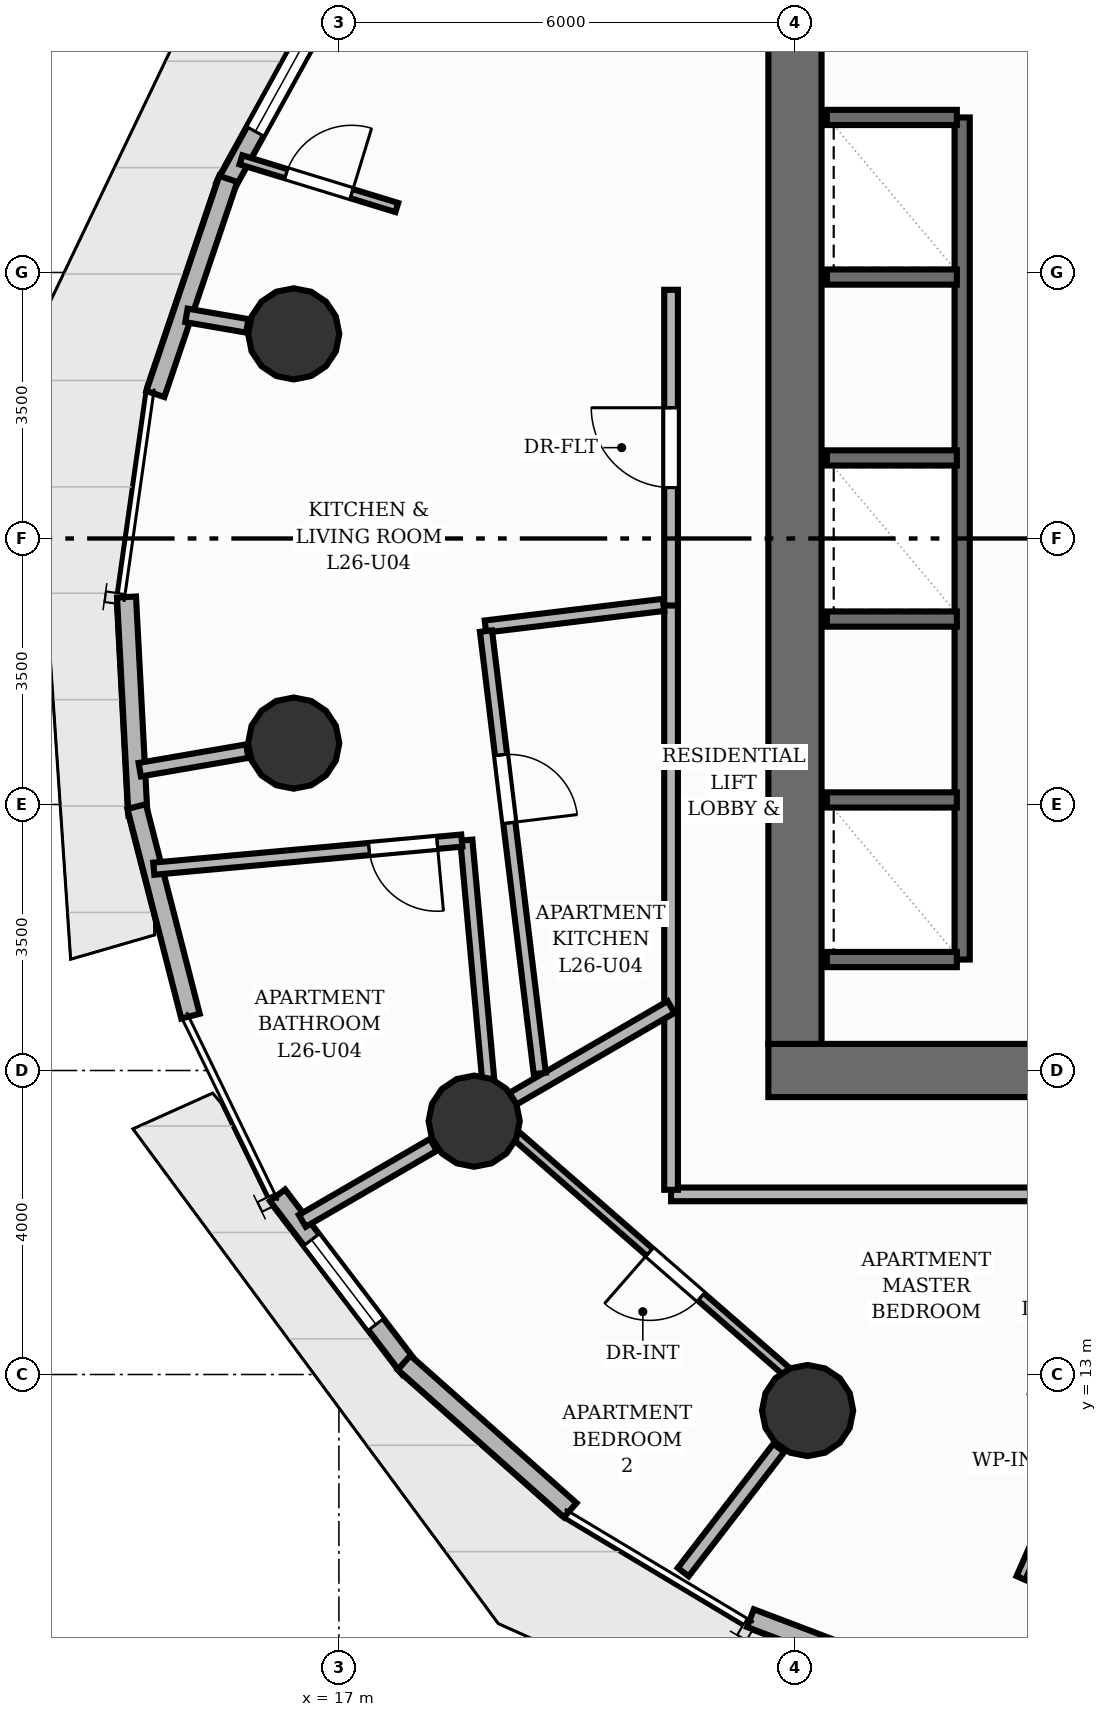
"""IFC4 building model, lengths in metres.
Left out: names, types, materials, properties, quantities, classifications, styles, units other than length and angle.
Written with IfcOpenShell. Run it as: python <this file> out.ifc"""

import sys

from ifc_helpers import new_model, si_unit, direction, frame, frame_2d, origin, origin_2d, place, context, subcontext, project, spatial, rectangle, circle, extrude, element, fill, save


model = new_model("IFC4")
c1 = context("Model", 3, precision=1e-05, world=origin(), true_north=direction((0.0, 1.0)))
c2 = subcontext(c1, "Body", "Model", "MODEL_VIEW")
j1 = project(units=[si_unit("LENGTHUNIT", "METRE"), si_unit("PLANEANGLEUNIT", "RADIAN")], contexts=[c1])
p1 = place(None, origin())
s1 = spatial("IfcSite", under=j1, at=p1, CompositionType="ELEMENT")
p2 = place(p1, origin())
s2 = spatial("IfcBuilding", under=s1, at=p2, CompositionType="ELEMENT")
p3 = place(p2, frame((0.0, 0.0, 90.08)))
s3 = spatial("IfcBuildingStorey", under=s2, at=p3, CompositionType="ELEMENT", Elevation=90.08)
p4 = place(p3, frame((22.65, 17.0, 0.0), z_axis=(0.0, 0.0, 1.0), x_axis=(1.0, 0.0, 0.0)))
e1 = element("IfcWall", 1, at=p4, inside=s3, PredefinedType="SHEAR", context=c2, shape_type="SweptSolid", body=[
    extrude(rectangle(XDim=18.7, YDim=0.7, at=frame_2d((9.35, 0.0))), origin(), (0.0, 0.0, 1.0), 3.2),
])
p5 = place(p4, frame((5.85, 0.0, 0.0)))
e2 = element("IfcOpeningElement", 2, at=p5, cuts=e1, PredefinedType="OPENING", context=c2, shape_type="SweptSolid", body=[
    extrude(rectangle(XDim=1.1, YDim=2.15, at=frame_2d((0.55, 1.075))), frame((0.0, 0.36, 0.0), z_axis=(0.0, -1.0, 0.0), x_axis=(1.0, 0.0, 0.0)), (0.0, 0.0, 1.0), 0.72),
])
p6 = place(p4, frame((9.4, 0.0, 0.0)))
e3 = element("IfcOpeningElement", 3, at=p6, cuts=e1, PredefinedType="OPENING", context=c2, shape_type="SweptSolid", body=[
    extrude(rectangle(XDim=0.9, YDim=2.1, at=frame_2d((0.45, 1.05))), frame((0.0, 0.36, 0.0), z_axis=(0.0, -1.0, 0.0), x_axis=(1.0, 0.0, 0.0)), (0.0, 0.0, 1.0), 0.72),
])
p7 = place(p3, frame((23.0, 17.35, 0.0), z_axis=(0.0, 0.0, 1.0), x_axis=(0.0, 1.0, 0.0)))
e4 = element("IfcWall", 4, at=p7, inside=s3, PredefinedType="SHEAR", context=c2, shape_type="SweptSolid", body=[
    extrude(rectangle(XDim=13.3, YDim=0.7, at=frame_2d((6.65, 0.0))), origin(), (0.0, 0.0, 1.0), 3.2),
])
for number, where, z_axis, x_axis in (
    (5, (16.406, 26.692, 0.0), (0.0, 0.0, 1.0), (1.0, 0.0, 0.0)),
    (6, (16.406, 21.308, 0.0), (0.0, 0.0, 1.0), (1.0, 0.0, 0.0)),
    (7, (18.78, 16.333, 0.0), (0.0, 0.0, 1.0), (1.0, 0.0, 0.0)),
    (8, (23.167, 12.526, 0.0), (0.0, 0.0, 1.0), (1.0, 0.0, 0.0)),
):
    element("IfcColumn", number, at=place(p3, frame(where, z_axis=z_axis, x_axis=x_axis)), inside=s3, PredefinedType="COLUMN", context=c2, shape_type="SweptSolid", body=[
        extrude(circle(Radius=0.6, at=origin_2d()), origin(), (0.0, 0.0, 1.0), 3.2),
    ])
p8 = place(p3, frame((15.5, 28.629, 0.0), z_axis=(0.0, 0.0, 1.0), x_axis=(0.482904421948, 0.875673066426, 0.0)))
e9 = element("IfcWall", 9, at=p8, inside=s3, PredefinedType="SOLIDWALL", context=c2, shape_type="SweptSolid", body=[
    extrude(rectangle(XDim=3.061, YDim=0.25, at=frame_2d((1.53, 0.0))), origin(), (0.0, 0.0, 1.0), 2.96),
])
p9 = place(p8, frame((0.83, 0.0, 0.85)))
e10 = element("IfcOpeningElement", 10, at=p9, cuts=e9, PredefinedType="OPENING", context=c2, shape_type="SweptSolid", body=[
    extrude(rectangle(XDim=1.4, YDim=1.55, at=frame_2d((0.7, 0.775))), frame((0.0, 0.135, 0.0), z_axis=(0.0, -1.0, 0.0), x_axis=(1.0, 0.0, 0.0)), (0.0, 0.0, 1.0), 0.27),
])
p10 = place(p3, frame((14.585, 25.901, 0.0), z_axis=(0.0, 0.0, 1.0), x_axis=(0.321149814784, 0.947028403198, 0.0)))
e11 = element("IfcWall", 11, at=p10, inside=s3, PredefinedType="SOLIDWALL", context=c2, shape_type="SweptSolid", body=[
    extrude(rectangle(XDim=2.988, YDim=0.25, at=frame_2d((1.494, 0.0))), origin(), (0.0, 0.0, 1.0), 2.96),
])
p11 = place(p3, frame((14.356, 20.36, 0.0), z_axis=(0.0, 0.0, 1.0), x_axis=(-0.052411702269, 0.998625562193, 0.0)))
e12 = element("IfcWall", 12, at=p11, inside=s3, PredefinedType="SOLIDWALL", context=c2, shape_type="SweptSolid", body=[
    extrude(rectangle(XDim=2.874, YDim=0.25, at=frame_2d((1.437, 0.0))), origin(), (0.0, 0.0, 1.0), 2.96),
])
p12 = place(p3, frame((15.047, 17.715, 0.0), z_axis=(0.0, 0.0, 1.0), x_axis=(-0.248825035787, 0.96854845081, 0.0)))
e13 = element("IfcWall", 13, at=p12, inside=s3, PredefinedType="SOLIDWALL", context=c2, shape_type="SweptSolid", body=[
    extrude(rectangle(XDim=2.847, YDim=0.25, at=frame_2d((1.424, 0.0))), origin(), (0.0, 0.0, 1.0), 2.96),
])
p13 = place(p3, frame((17.935, 13.073, 0.0), z_axis=(0.0, 0.0, 1.0), x_axis=(-0.606166055027, 0.795338112838, 0.0)))
e14 = element("IfcWall", 14, at=p13, inside=s3, PredefinedType="SOLIDWALL", context=c2, shape_type="SweptSolid", body=[
    extrude(rectangle(XDim=2.874, YDim=0.25, at=frame_2d((1.437, 0.0))), origin(), (0.0, 0.0, 1.0), 2.96),
])
p14 = place(p13, frame((0.737, 0.0, 0.85)))
e15 = element("IfcOpeningElement", 15, at=p14, cuts=e14, PredefinedType="OPENING", context=c2, shape_type="SweptSolid", body=[
    extrude(rectangle(XDim=1.4, YDim=1.37, at=frame_2d((0.7, 0.685))), frame((0.0, 0.135, 0.0), z_axis=(0.0, -1.0, 0.0), x_axis=(1.0, 0.0, 0.0)), (0.0, 0.0, 1.0), 0.27),
])
p15 = place(p3, frame((20.043, 11.216, 0.0), z_axis=(0.0, 0.0, 1.0), x_axis=(-0.747828492436, 0.663891968547, 0.0)))
e16 = element("IfcWall", 16, at=p15, inside=s3, PredefinedType="SOLIDWALL", context=c2, shape_type="SweptSolid", body=[
    extrude(rectangle(XDim=2.923, YDim=0.25, at=frame_2d((1.461, 0.0))), origin(), (0.0, 0.0, 1.0), 2.96),
])
p16 = place(p3, frame((25.276, 8.707, 0.0), z_axis=(0.0, 0.0, 1.0), x_axis=(-0.934815891493, 0.355132720277, 0.0)))
e17 = element("IfcWall", 17, at=p16, inside=s3, PredefinedType="SOLIDWALL", context=c2, shape_type="SweptSolid", body=[
    extrude(rectangle(XDim=3.061, YDim=0.25, at=frame_2d((1.53, 0.0))), origin(), (0.0, 0.0, 1.0), 2.96),
])
p17 = place(p3, frame((25.2, 18.46, 0.0), z_axis=(0.0, 0.0, 1.0), x_axis=(0.0, 1.0, 0.0)))
e18 = element("IfcWall", 18, at=p17, inside=s3, PredefinedType="SHEAR", context=c2, shape_type="SweptSolid", body=[
    extrude(rectangle(XDim=11.08, YDim=0.2, at=frame_2d((5.54, 0.0))), origin(), (0.0, 0.0, 1.0), 3.2),
])
for number, where, z_axis, x_axis in (
    (19, (23.42, 18.46, 0.0), (0.0, 0.0, 1.0), (1.0, 0.0, 0.0)),
    (20, (23.42, 29.54, 0.0), (0.0, 0.0, 1.0), (1.0, 0.0, 0.0)),
    (21, (23.42, 20.56, 0.0), (0.0, 0.0, 1.0), (1.0, 0.0, 0.0)),
    (22, (23.42, 22.94, 0.0), (0.0, 0.0, 1.0), (1.0, 0.0, 0.0)),
    (23, (23.42, 25.06, 0.0), (0.0, 0.0, 1.0), (1.0, 0.0, 0.0)),
    (24, (23.42, 27.44, 0.0), (0.0, 0.0, 1.0), (1.0, 0.0, 0.0)),
):
    element("IfcWall", number, at=place(p3, frame(where, z_axis=z_axis, x_axis=x_axis)), inside=s3, PredefinedType="SHEAR", context=c2, shape_type="SweptSolid", body=[
        extrude(rectangle(XDim=1.71, YDim=0.2, at=frame_2d((0.855, 0.0))), origin(), (0.0, 0.0, 1.0), 3.2),
    ])
p18 = place(p3, frame((15.794, 26.798, 0.0), z_axis=(0.0, 0.0, 1.0), x_axis=(-0.985418430365, 0.170148514822, 0.0)))
e25 = element("IfcWall", 25, at=p18, inside=s3, PredefinedType="PARTITIONING", context=c2, shape_type="SweptSolid", body=[
    extrude(rectangle(XDim=0.812, YDim=0.18, at=frame_2d((0.406, 0.0))), origin(), (0.0, 0.0, 1.0), 2.26),
])
p19 = place(p3, frame((15.794, 21.202, 0.0), z_axis=(0.0, 0.0, 1.0), x_axis=(-0.985402123708, -0.170242928172, 0.0)))
e26 = element("IfcWall", 26, at=p19, inside=s3, PredefinedType="PARTITIONING", context=c2, shape_type="SweptSolid", body=[
    extrude(rectangle(XDim=1.436, YDim=0.18, at=frame_2d((0.718, 0.0))), origin(), (0.0, 0.0, 1.0), 2.26),
])
p20 = place(p3, frame((18.243, 16.022, 0.0), z_axis=(0.0, 0.0, 1.0), x_axis=(-0.865046065875, -0.501692439563, 0.0)))
e27 = element("IfcWall", 27, at=p20, inside=s3, PredefinedType="PARTITIONING", context=c2, shape_type="SweptSolid", body=[
    extrude(rectangle(XDim=1.994, YDim=0.18, at=frame_2d((0.997, 0.0))), origin(), (0.0, 0.0, 1.0), 2.26),
])
p21 = place(p3, frame((22.788, 12.034, 0.0), z_axis=(0.0, 0.0, 1.0), x_axis=(-0.609991040385, -0.792408310564, 0.0)))
e28 = element("IfcWall", 28, at=p21, inside=s3, PredefinedType="PARTITIONING", context=c2, shape_type="SweptSolid", body=[
    extrude(rectangle(XDim=2.062, YDim=0.18, at=frame_2d((1.031, 0.0))), origin(), (0.0, 0.0, 1.0), 2.26),
])
p22 = place(p3, frame((41.695, 15.37, 0.0), z_axis=(0.0, 0.0, 1.0), x_axis=(-1.0, 0.0, 0.0)))
e29 = element("IfcWall", 29, at=p22, inside=s3, PredefinedType="PARTITIONING", context=c2, shape_type="SweptSolid", body=[
    extrude(rectangle(XDim=20.325, YDim=0.18, at=frame_2d((10.163, 0.0))), origin(), (0.0, 0.0, 1.0), 2.955),
])
p23 = place(p22, frame((11.424, 0.0, 0.0)))
e30 = element("IfcOpeningElement", 30, at=p23, cuts=e29, PredefinedType="OPENING", context=c2, shape_type="SweptSolid", body=[
    extrude(rectangle(XDim=1.05, YDim=2.15, at=frame_2d((0.525, 1.075))), frame((0.0, 0.1, 0.0), z_axis=(0.0, -1.0, 0.0), x_axis=(1.0, 0.0, 0.0)), (0.0, 0.0, 1.0), 0.2),
])
p24 = place(p3, frame((21.37, 15.43, 0.0), z_axis=(0.0, 0.0, 1.0), x_axis=(0.0, 1.0, 0.0)))
e31 = element("IfcWall", 31, at=p24, inside=s3, PredefinedType="PARTITIONING", context=c2, shape_type="SweptSolid", body=[
    extrude(rectangle(XDim=7.727, YDim=0.18, at=frame_2d((3.863, 0.0))), origin(), (0.0, 0.0, 1.0), 2.955),
])
p25 = place(p3, frame((21.37, 23.118, 0.0), z_axis=(0.0, 0.0, 1.0), x_axis=(0.0, 1.0, 0.0)))
e32 = element("IfcWall", 32, at=p25, inside=s3, PredefinedType="PARTITIONING", context=c2, shape_type="SweptSolid", body=[
    extrude(rectangle(XDim=4.154, YDim=0.18, at=frame_2d((2.077, 0.0))), origin(), (0.0, 0.0, 1.0), 2.955),
])
p26 = place(p25, frame((1.552, 0.0, 0.0)))
e33 = element("IfcOpeningElement", 33, at=p26, cuts=e32, PredefinedType="OPENING", context=c2, shape_type="SweptSolid", body=[
    extrude(rectangle(XDim=1.05, YDim=2.15, at=frame_2d((0.525, 1.075))), frame((0.0, 0.1, 0.0), z_axis=(0.0, -1.0, 0.0), x_axis=(1.0, 0.0, 0.0)), (0.0, 0.0, 1.0), 0.2),
])
p27 = place(p3, frame((25.973, 10.322, 0.0), z_axis=(0.0, 0.0, 1.0), x_axis=(0.403235845427, 0.91509608947, 0.0)))
e34 = element("IfcWall", 34, at=p27, inside=s3, PredefinedType="PARTITIONING", context=c2, shape_type="SweptSolid", body=[
    extrude(rectangle(XDim=5.396, YDim=0.125, at=frame_2d((2.698, 0.0))), origin(), (0.0, 0.0, 1.0), 2.955),
])
p28 = place(p27, frame((2.248, 0.0, 0.0)))
e35 = element("IfcOpeningElement", 35, at=p28, cuts=e34, PredefinedType="OPENING", context=c2, shape_type="SweptSolid", body=[
    extrude(rectangle(XDim=0.9, YDim=2.1, at=frame_2d((0.45, 1.05))), frame((0.0, 0.073, 0.0), z_axis=(0.0, -1.0, 0.0), x_axis=(1.0, 0.0, 0.0)), (0.0, 0.0, 1.0), 0.145),
])
p29 = place(p3, frame((22.888, 13.04, 0.0), z_axis=(0.0, 0.0, 1.0), x_axis=(-0.753425123405, 0.657533712765, 0.0)))
e36 = element("IfcWall", 36, at=p29, inside=s3, PredefinedType="PARTITIONING", context=c2, shape_type="SweptSolid", body=[
    extrude(rectangle(XDim=4.72, YDim=0.125, at=frame_2d((2.36, 0.0))), origin(), (0.0, 0.0, 1.0), 2.403),
])
p30 = place(p29, frame((1.49, 0.0, 0.0)))
e37 = element("IfcOpeningElement", 37, at=p30, cuts=e36, PredefinedType="OPENING", context=c2, shape_type="SweptSolid", body=[
    extrude(rectangle(XDim=0.9, YDim=2.1, at=frame_2d((0.45, 1.05))), frame((0.0, 0.073, 0.0), z_axis=(0.0, -1.0, 0.0), x_axis=(1.0, 0.0, 0.0)), (0.0, 0.0, 1.0), 0.145),
])
p31 = place(p3, frame((19.288, 16.628, 0.0), z_axis=(0.0, 0.0, 1.0), x_axis=(0.86502326608, 0.501731750182, 0.0)))
e38 = element("IfcWall", 38, at=p31, inside=s3, PredefinedType="PARTITIONING", context=c2, shape_type="SweptSolid", body=[
    extrude(rectangle(XDim=2.407, YDim=0.18, at=frame_2d((1.204, 0.0))), origin(), (0.0, 0.0, 1.0), 2.26),
])
p32 = place(p3, frame((18.964, 16.887, 0.0), z_axis=(0.0, 0.0, 1.0), x_axis=(-0.091023836021, 0.995848714051, 0.0)))
e39 = element("IfcWall", 39, at=p32, inside=s3, PredefinedType="PLUMBINGWALL", context=c2, shape_type="SweptSolid", body=[
    extrude(rectangle(XDim=3.157, YDim=0.16, at=frame_2d((1.579, 0.0))), origin(), (0.0, 0.0, 1.0), 2.955),
])
p33 = place(p3, frame((18.616, 20.025, 0.0), z_axis=(0.0, 0.0, 1.0), x_axis=(-0.995848823867, -0.091022634561, 0.0)))
e40 = element("IfcWall", 40, at=p33, inside=s3, PredefinedType="PLUMBINGWALL", context=c2, shape_type="SweptSolid", body=[
    extrude(rectangle(XDim=4.069, YDim=0.16, at=frame_2d((2.034, 0.0))), origin(), (0.0, 0.0, 1.0), 2.641),
])
p34 = place(p33, frame((0.324, 0.0, 0.0)))
e41 = element("IfcOpeningElement", 41, at=p34, cuts=e40, PredefinedType="OPENING", context=c2, shape_type="SweptSolid", body=[
    extrude(rectangle(XDim=0.9, YDim=2.1, at=frame_2d((0.45, 1.05))), frame((0.0, 0.09, 0.0), z_axis=(0.0, -1.0, 0.0), x_axis=(1.0, 0.0, 0.0)), (0.0, 0.0, 1.0), 0.18),
])
p35 = place(p3, frame((15.712, 28.982, 0.0), z_axis=(0.0, 0.0, 1.0), x_axis=(0.956248079097, -0.292557022175, 0.0)))
e42 = element("IfcWall", 42, at=p35, inside=s3, PredefinedType="PARTITIONING", context=c2, shape_type="SweptSolid", body=[
    extrude(rectangle(XDim=2.144, YDim=0.125, at=frame_2d((1.072, 0.0))), origin(), (0.0, 0.0, 1.0), 2.641),
])
p36 = place(p35, frame((0.622, 0.0, 0.0)))
e43 = element("IfcOpeningElement", 43, at=p36, cuts=e42, PredefinedType="OPENING", context=c2, shape_type="SweptSolid", body=[
    extrude(rectangle(XDim=0.9, YDim=2.1, at=frame_2d((0.45, 1.05))), frame((0.0, 0.073, 0.0), z_axis=(0.0, -1.0, 0.0), x_axis=(1.0, 0.0, 0.0)), (0.0, 0.0, 1.0), 0.145),
])
p37 = place(p3, frame((21.271, 23.126, 0.0), z_axis=(0.0, 0.0, 1.0), x_axis=(-0.992687653986, -0.120711315224, 0.0)))
e44 = element("IfcWall", 44, at=p37, inside=s3, PredefinedType="PLUMBINGWALL", context=c2, shape_type="SweptSolid", body=[
    extrude(rectangle(XDim=2.36, YDim=0.16, at=frame_2d((1.18, 0.0))), origin(), (0.0, 0.0, 1.0), 2.955),
])
p38 = place(p3, frame((18.935, 22.782, 0.0), z_axis=(0.0, 0.0, 1.0), x_axis=(0.120703145243, -0.992688647426, 0.0)))
e45 = element("IfcWall", 45, at=p38, inside=s3, PredefinedType="PLUMBINGWALL", context=c2, shape_type="SweptSolid", body=[
    extrude(rectangle(XDim=5.864, YDim=0.16, at=frame_2d((2.932, 0.0))), origin(), (0.0, 0.0, 1.0), 2.955),
])
p39 = place(p38, frame((1.642, 0.0, 0.0)))
e46 = element("IfcOpeningElement", 46, at=p39, cuts=e45, PredefinedType="OPENING", context=c2, shape_type="SweptSolid", body=[
    extrude(rectangle(XDim=0.9, YDim=2.1, at=frame_2d((0.45, 1.05))), frame((0.0, 0.09, 0.0), z_axis=(0.0, -1.0, 0.0), x_axis=(1.0, 0.0, 0.0)), (0.0, 0.0, 1.0), 0.18),
])
p40 = place(p9, origin())
e47 = element("IfcWindow", 47, at=p40, inside=s3, PartitioningType="SINGLE_PANEL", PredefinedType="WINDOW", context=c2, shape_type="SweptSolid", body=[
    extrude(rectangle(XDim=1.4, YDim=1.55, at=frame_2d((0.7, 0.775))), frame((0.0, 0.03, 0.0), z_axis=(0.0, -1.0, 0.0), x_axis=(1.0, 0.0, 0.0)), (0.0, 0.0, 1.0), 0.06),
])
fill(e10, e47)
p41 = place(p14, origin())
e48 = element("IfcWindow", 48, at=p41, inside=s3, PartitioningType="SINGLE_PANEL", PredefinedType="WINDOW", context=c2, shape_type="SweptSolid", body=[
    extrude(rectangle(XDim=1.4, YDim=1.37, at=frame_2d((0.7, 0.685))), frame((0.0, 0.03, 0.0), z_axis=(0.0, -1.0, 0.0), x_axis=(1.0, 0.0, 0.0)), (0.0, 0.0, 1.0), 0.06),
])
fill(e15, e48)
p42 = place(p30, origin())
e49 = element("IfcDoor", 49, at=p42, inside=s3, OperationType="SINGLE_SWING_RIGHT", PredefinedType="DOOR", context=c2, shape_type="SweptSolid", body=[
    extrude(rectangle(XDim=0.9, YDim=2.1, at=frame_2d((0.45, 1.05))), frame((0.0, 0.025, 0.0), z_axis=(0.0, -1.0, 0.0), x_axis=(1.0, 0.0, 0.0)), (0.0, 0.0, 1.0), 0.05),
])
fill(e37, e49)
p43 = place(p26, origin())
e50 = element("IfcDoor", 50, at=p43, inside=s3, OperationType="SINGLE_SWING_RIGHT", PredefinedType="DOOR", context=c2, shape_type="SweptSolid", body=[
    extrude(rectangle(XDim=1.05, YDim=2.15, at=frame_2d((0.525, 1.075))), frame((0.0, 0.025, 0.0), z_axis=(0.0, -1.0, 0.0), x_axis=(1.0, 0.0, 0.0)), (0.0, 0.0, 1.0), 0.05),
])
fill(e33, e50)
p44 = place(p34, origin())
e51 = element("IfcDoor", 51, at=p44, inside=s3, OperationType="SINGLE_SWING_LEFT", PredefinedType="DOOR", context=c2, shape_type="SweptSolid", body=[
    extrude(rectangle(XDim=0.9, YDim=2.1, at=frame_2d((0.45, 1.05))), frame((0.0, 0.025, 0.0), z_axis=(0.0, -1.0, 0.0), x_axis=(1.0, 0.0, 0.0)), (0.0, 0.0, 1.0), 0.05),
])
fill(e41, e51)
p45 = place(p36, origin())
e52 = element("IfcDoor", 52, at=p45, inside=s3, OperationType="SINGLE_SWING_RIGHT", PredefinedType="DOOR", context=c2, shape_type="SweptSolid", body=[
    extrude(rectangle(XDim=0.9, YDim=2.1, at=frame_2d((0.45, 1.05))), frame((0.0, 0.025, 0.0), z_axis=(0.0, -1.0, 0.0), x_axis=(1.0, 0.0, 0.0)), (0.0, 0.0, 1.0), 0.05),
])
fill(e43, e52)
p46 = place(p39, origin())
e53 = element("IfcDoor", 53, at=p46, inside=s3, OperationType="SINGLE_SWING_RIGHT", PredefinedType="DOOR", context=c2, shape_type="SweptSolid", body=[
    extrude(rectangle(XDim=0.9, YDim=2.1, at=frame_2d((0.45, 1.05))), frame((0.0, 0.025, 0.0), z_axis=(0.0, -1.0, 0.0), x_axis=(1.0, 0.0, 0.0)), (0.0, 0.0, 1.0), 0.05),
])
fill(e46, e53)
save(model, sys.argv[1])
